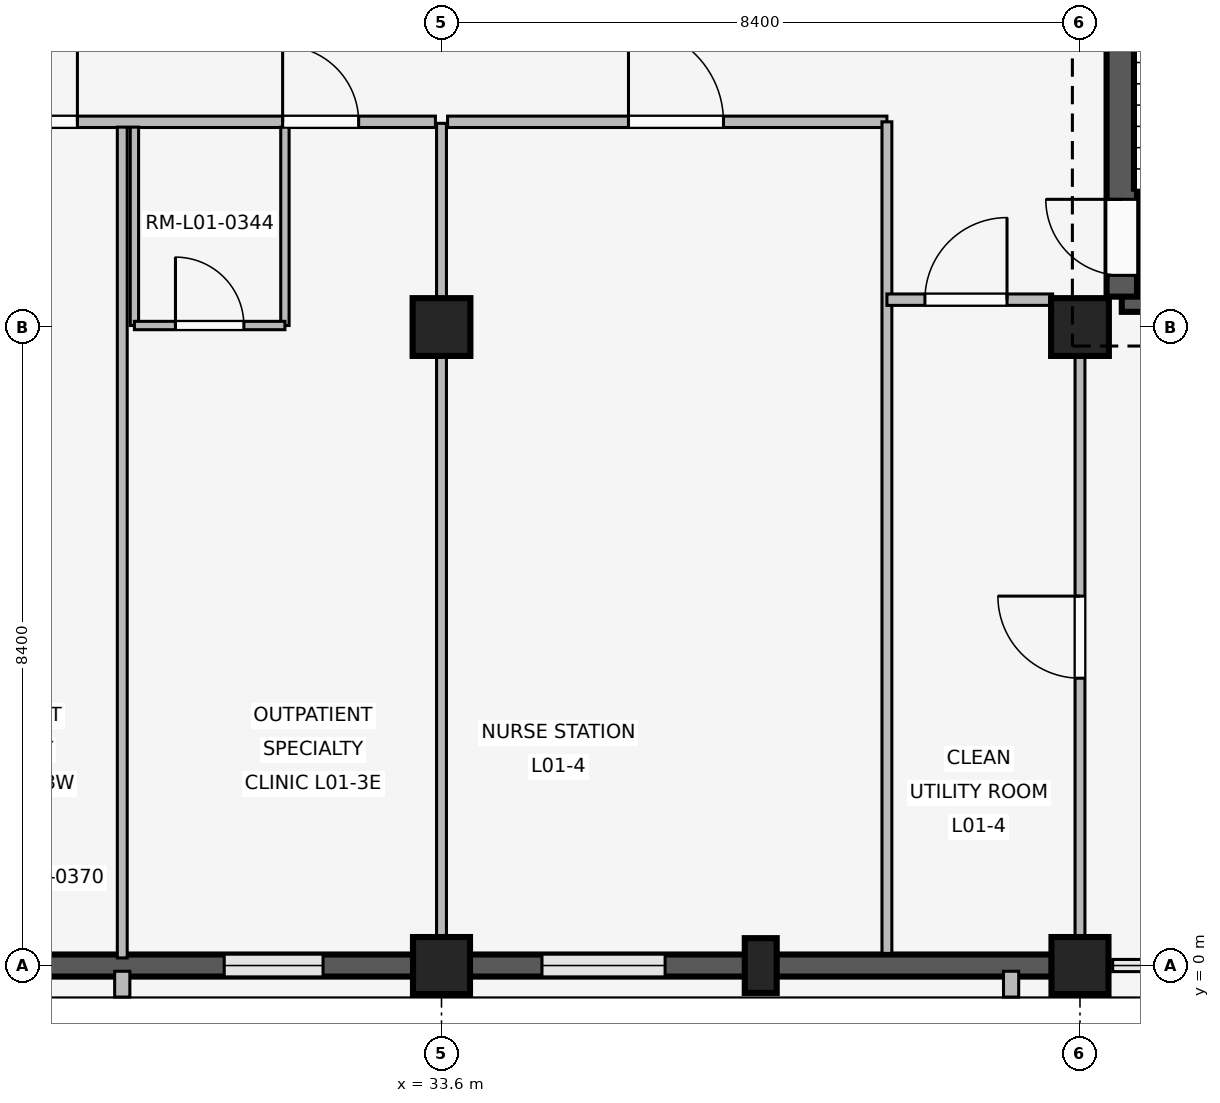
"""IFC4 building model, lengths in metres.
Left out: names, types, materials, properties, quantities, classifications, styles, units other than length and angle.
Written with IfcOpenShell. Run it as: python <this file> out.ifc"""

import sys

from ifc_helpers import new_model, si_unit, direction, frame, frame_2d, origin, origin_2d, place, context, subcontext, project, spatial, rectangle, extrude, element, fill, save


model = new_model("IFC4")
c1 = context("Model", 3, precision=1e-05, world=origin(), true_north=direction((0.0, 1.0)))
c2 = subcontext(c1, "Body", "Model", "MODEL_VIEW")
j1 = project(units=[si_unit("LENGTHUNIT", "METRE"), si_unit("PLANEANGLEUNIT", "RADIAN")], contexts=[c1])
p1 = place(None, origin())
s1 = spatial("IfcSite", under=j1, at=p1, CompositionType="ELEMENT")
p2 = place(p1, origin())
s2 = spatial("IfcBuilding", under=s1, at=p2, CompositionType="ELEMENT")
p3 = place(p2, frame((0.0, 0.0, 4.8)))
s3 = spatial("IfcBuildingStorey", under=s2, at=p3, CompositionType="ELEMENT", Elevation=4.8)
p4 = place(p3, frame((33.6, 0.0, 0.0), z_axis=(0.0, 0.0, 1.0), x_axis=(1.0, 0.0, 0.0)))
e1 = element("IfcColumn", 1, at=p4, inside=s3, PredefinedType="COLUMN", context=c2, shape_type="SweptSolid", body=[
    extrude(rectangle(XDim=0.75, YDim=0.75, at=origin_2d()), origin(), (0.0, 0.0, 1.0), 3.3),
])
p5 = place(p3, frame((33.6, 8.4, 0.0), z_axis=(0.0, 0.0, 1.0), x_axis=(1.0, 0.0, 0.0)))
e2 = element("IfcColumn", 2, at=p5, inside=s3, PredefinedType="COLUMN", context=c2, shape_type="SweptSolid", body=[
    extrude(rectangle(XDim=0.76, YDim=0.76, at=origin_2d()), origin(), (0.0, 0.0, 1.0), 3.3),
])
p6 = place(p3, frame((42.0, 0.0, 0.0), z_axis=(0.0, 0.0, 1.0), x_axis=(1.0, 0.0, 0.0)))
e3 = element("IfcColumn", 3, at=p6, inside=s3, PredefinedType="COLUMN", context=c2, shape_type="SweptSolid", body=[
    extrude(rectangle(XDim=0.75, YDim=0.75, at=origin_2d()), origin(), (0.0, 0.0, 1.0), 3.3),
])
p7 = place(p3, frame((42.0, 8.4, 0.0), z_axis=(0.0, 0.0, 1.0), x_axis=(1.0, 0.0, 0.0)))
e4 = element("IfcColumn", 4, at=p7, inside=s3, PredefinedType="COLUMN", context=c2, shape_type="SweptSolid", body=[
    extrude(rectangle(XDim=0.76, YDim=0.76, at=origin_2d()), origin(), (0.0, 0.0, 1.0), 3.3),
])
p8 = place(p3, frame((37.8, 0.0, 0.0), z_axis=(0.0, 0.0, 1.0), x_axis=(1.0, 0.0, 0.0)))
e5 = element("IfcColumn", 5, at=p8, inside=s3, PredefinedType="PILASTER", context=c2, shape_type="SweptSolid", body=[
    extrude(rectangle(XDim=0.42, YDim=0.72, at=origin_2d()), origin(), (0.0, 0.0, 1.0), 3.3),
])
p9 = place(p3, frame((33.23, 0.0, 0.0), z_axis=(0.0, 0.0, 1.0), x_axis=(-1.0, 0.0, 0.0)))
e6 = element("IfcWall", 6, at=p9, inside=s3, PredefinedType="SOLIDWALL", context=c2, shape_type="SweptSolid", body=[
    extrude(rectangle(XDim=7.66, YDim=0.29, at=frame_2d((3.83, 0.0))), origin(), (0.0, 0.0, 1.0), 2.42),
])
p10 = place(p9, frame((1.188, 0.0, 1.05)))
e7 = element("IfcOpeningElement", 7, at=p10, cuts=e6, PredefinedType="OPENING", context=c2, shape_type="SweptSolid", body=[
    extrude(rectangle(XDim=1.3, YDim=0.75, at=frame_2d((0.65, 0.375))), frame((0.0, 0.155, 0.0), z_axis=(0.0, -1.0, 0.0), x_axis=(1.0, 0.0, 0.0)), (0.0, 0.0, 1.0), 0.31),
])
p11 = place(p9, frame((5.172, 0.0, 1.05)))
e8 = element("IfcOpeningElement", 8, at=p11, cuts=e6, PredefinedType="OPENING", context=c2, shape_type="SweptSolid", body=[
    extrude(rectangle(XDim=1.3, YDim=0.75, at=frame_2d((0.65, 0.375))), frame((0.0, 0.155, 0.0), z_axis=(0.0, -1.0, 0.0), x_axis=(1.0, 0.0, 0.0)), (0.0, 0.0, 1.0), 0.31),
])
p12 = place(p3, frame((29.4, -0.075, 0.0), z_axis=(0.0, 0.0, 1.0), x_axis=(0.0, -1.0, 0.0)))
e9 = element("IfcWall", 9, at=p12, inside=s3, PredefinedType="ELEMENTEDWALL", context=c2, shape_type="SweptSolid", body=[
    extrude(rectangle(XDim=0.34, YDim=0.2, at=frame_2d((0.17, 0.0))), origin(), (0.0, 0.0, 1.0), 2.4),
])
p13 = place(p3, frame((41.63, 0.0, 0.0), z_axis=(0.0, 0.0, 1.0), x_axis=(-1.0, 0.0, 0.0)))
e10 = element("IfcWall", 10, at=p13, inside=s3, PredefinedType="SOLIDWALL", context=c2, shape_type="SweptSolid", body=[
    extrude(rectangle(XDim=7.66, YDim=0.29, at=frame_2d((3.83, 0.0))), origin(), (0.0, 0.0, 1.0), 2.42),
])
p14 = place(p13, frame((5.088, 0.0, 0.85)))
e11 = element("IfcOpeningElement", 11, at=p14, cuts=e10, PredefinedType="OPENING", context=c2, shape_type="SweptSolid", body=[
    extrude(rectangle(XDim=1.62, YDim=0.95, at=frame_2d((0.81, 0.475))), frame((0.0, 0.155, 0.0), z_axis=(0.0, -1.0, 0.0), x_axis=(1.0, 0.0, 0.0)), (0.0, 0.0, 1.0), 0.31),
])
p15 = place(p3, frame((41.094, -0.075, 0.0), z_axis=(0.0, 0.0, 1.0), x_axis=(0.0, -1.0, 0.0)))
e12 = element("IfcWall", 12, at=p15, inside=s3, PredefinedType="ELEMENTEDWALL", context=c2, shape_type="SweptSolid", body=[
    extrude(rectangle(XDim=0.34, YDim=0.2, at=frame_2d((0.17, 0.0))), origin(), (0.0, 0.0, 1.0), 2.4),
])
p16 = place(p3, frame((42.55, 8.8, 0.0), z_axis=(0.0, 0.0, 1.0), x_axis=(1.0, 0.0, 0.0)))
e13 = element("IfcWall", 13, at=p16, inside=s3, PredefinedType="SHEAR", context=c2, shape_type="SweptSolid", body=[
    extrude(rectangle(XDim=7.5, YDim=0.4, at=frame_2d((3.75, 0.0))), origin(), (0.0, 0.0, 1.0), 3.02),
])
p17 = place(p16, frame((4.85, 0.0, 0.0)))
e14 = element("IfcOpeningElement", 14, at=p17, cuts=e13, PredefinedType="OPENING", context=c2, shape_type="SweptSolid", body=[
    extrude(rectangle(XDim=1.2, YDim=2.1, at=frame_2d((0.6, 1.05))), frame((0.0, 0.21, 0.0), z_axis=(0.0, -1.0, 0.0), x_axis=(1.0, 0.0, 0.0)), (0.0, 0.0, 1.0), 0.42),
])
p18 = place(p3, frame((42.55, 8.8, 0.0), z_axis=(0.0, 0.0, 1.0), x_axis=(0.0, 1.0, 0.0)))
e15 = element("IfcWall", 15, at=p18, inside=s3, PredefinedType="SHEAR", context=c2, shape_type="SweptSolid", body=[
    extrude(rectangle(XDim=7.55, YDim=0.4, at=frame_2d((3.775, 0.0))), origin(), (0.0, 0.0, 1.0), 3.02),
])
p19 = place(p18, frame((0.28, 0.0, 0.0)))
e16 = element("IfcOpeningElement", 16, at=p19, cuts=e15, PredefinedType="OPENING", context=c2, shape_type="SweptSolid", body=[
    extrude(rectangle(XDim=1.0, YDim=2.15, at=frame_2d((0.5, 1.075))), frame((0.0, 0.21, 0.0), z_axis=(0.0, -1.0, 0.0), x_axis=(1.0, 0.0, 0.0)), (0.0, 0.0, 1.0), 0.42),
])
p20 = place(p3, frame((25.28, 11.1, 0.0), z_axis=(0.0, 0.0, 1.0), x_axis=(1.0, 0.0, 0.0)))
e17 = element("IfcWall", 17, at=p20, inside=s3, PredefinedType="PARTITIONING", context=c2, shape_type="SweptSolid", body=[
    extrude(rectangle(XDim=8.24, YDim=0.15, at=frame_2d((4.12, 0.0))), origin(), (0.0, 0.0, 1.0), 2.4),
])
p21 = place(p20, frame((2.53, 0.0, 0.0)))
e18 = element("IfcOpeningElement", 18, at=p21, cuts=e17, PredefinedType="OPENING", context=c2, shape_type="SweptSolid", body=[
    extrude(rectangle(XDim=1.0, YDim=2.15, at=frame_2d((0.5, 1.075))), frame((0.0, 0.085, 0.0), z_axis=(0.0, -1.0, 0.0), x_axis=(1.0, 0.0, 0.0)), (0.0, 0.0, 1.0), 0.17),
])
p22 = place(p20, frame((6.23, 0.0, 0.0)))
e19 = element("IfcOpeningElement", 19, at=p22, cuts=e17, PredefinedType="OPENING", context=c2, shape_type="SweptSolid", body=[
    extrude(rectangle(XDim=1.0, YDim=2.15, at=frame_2d((0.5, 1.075))), frame((0.0, 0.085, 0.0), z_axis=(0.0, -1.0, 0.0), x_axis=(1.0, 0.0, 0.0)), (0.0, 0.0, 1.0), 0.17),
])
p23 = place(p3, frame((29.4, 0.1, 0.0), z_axis=(0.0, 0.0, 1.0), x_axis=(0.0, 1.0, 0.0)))
e20 = element("IfcWall", 20, at=p23, inside=s3, PredefinedType="PARTITIONING", context=c2, shape_type="SweptSolid", body=[
    extrude(rectangle(XDim=10.93, YDim=0.13, at=frame_2d((5.465, 0.0))), origin(), (0.0, 0.0, 1.0), 2.4),
])
for number, where, z_axis, x_axis in (
    (21, (29.56, 8.42, 0.0), (0.0, 0.0, 1.0), (0.0, 1.0, 0.0)),
    (22, (31.54, 8.42, 0.0), (0.0, 0.0, 1.0), (0.0, 1.0, 0.0)),
):
    element("IfcWall", number, at=place(p3, frame(where, z_axis=z_axis, x_axis=x_axis)), inside=s3, PredefinedType="PARTITIONING", context=c2, shape_type="SweptSolid", body=[
        extrude(rectangle(XDim=2.61, YDim=0.11, at=frame_2d((1.305, 0.0))), origin(), (0.0, 0.0, 1.0), 2.4),
    ])
p24 = place(p3, frame((29.56, 8.42, 0.0), z_axis=(0.0, 0.0, 1.0), x_axis=(1.0, 0.0, 0.0)))
e23 = element("IfcWall", 23, at=p24, inside=s3, PredefinedType="PARTITIONING", context=c2, shape_type="SweptSolid", body=[
    extrude(rectangle(XDim=1.98, YDim=0.11, at=frame_2d((0.99, 0.0))), origin(), (0.0, 0.0, 1.0), 2.4),
])
p25 = place(p24, frame((0.54, 0.0, 0.0)))
e24 = element("IfcOpeningElement", 24, at=p25, cuts=e23, PredefinedType="OPENING", context=c2, shape_type="SweptSolid", body=[
    extrude(rectangle(XDim=0.9, YDim=2.1, at=frame_2d((0.45, 1.05))), frame((0.0, 0.065, 0.0), z_axis=(0.0, -1.0, 0.0), x_axis=(1.0, 0.0, 0.0)), (0.0, 0.0, 1.0), 0.13),
])
p26 = place(p3, frame((28.05, 1.15, 0.0), z_axis=(0.0, 0.0, 1.0), x_axis=(1.0, 0.0, 0.0)))
e25 = element("IfcWall", 25, at=p26, inside=s3, PredefinedType="PLUMBINGWALL", context=c2, shape_type="SweptSolid", body=[
    extrude(rectangle(XDim=0.9, YDim=0.24, at=frame_2d((0.45, 0.0))), origin(), (0.0, 0.0, 1.0), 2.4),
])
p27 = place(p3, frame((33.6, 0.14, 0.0), z_axis=(0.0, 0.0, 1.0), x_axis=(0.0, 1.0, 0.0)))
e26 = element("IfcWall", 26, at=p27, inside=s3, PredefinedType="PARTITIONING", context=c2, shape_type="SweptSolid", body=[
    extrude(rectangle(XDim=10.94, YDim=0.13, at=frame_2d((5.47, 0.0))), origin(), (0.0, 0.0, 1.0), 2.4),
])
p28 = place(p3, frame((33.68, 11.1, 0.0), z_axis=(0.0, 0.0, 1.0), x_axis=(1.0, 0.0, 0.0)))
e27 = element("IfcWall", 27, at=p28, inside=s3, PredefinedType="PARTITIONING", context=c2, shape_type="SweptSolid", body=[
    extrude(rectangle(XDim=5.78, YDim=0.15, at=frame_2d((2.89, 0.0))), origin(), (0.0, 0.0, 1.0), 2.4),
])
p29 = place(p28, frame((2.38, 0.0, 0.0)))
e28 = element("IfcOpeningElement", 28, at=p29, cuts=e27, PredefinedType="OPENING", context=c2, shape_type="SweptSolid", body=[
    extrude(rectangle(XDim=1.25, YDim=2.2, at=frame_2d((0.625, 1.1))), frame((0.0, 0.085, 0.0), z_axis=(0.0, -1.0, 0.0), x_axis=(1.0, 0.0, 0.0)), (0.0, 0.0, 1.0), 0.17),
])
p30 = place(p3, frame((39.46, 0.16, 0.0), z_axis=(0.0, 0.0, 1.0), x_axis=(0.0, 1.0, 0.0)))
e29 = element("IfcWall", 29, at=p30, inside=s3, PredefinedType="PARTITIONING", context=c2, shape_type="SweptSolid", body=[
    extrude(rectangle(XDim=10.94, YDim=0.13, at=frame_2d((5.47, 0.0))), origin(), (0.0, 0.0, 1.0), 2.4),
])
p31 = place(p3, frame((39.46, 8.76, 0.0), z_axis=(0.0, 0.0, 1.0), x_axis=(1.0, 0.0, 0.0)))
e30 = element("IfcWall", 30, at=p31, inside=s3, PredefinedType="PARTITIONING", context=c2, shape_type="SweptSolid", body=[
    extrude(rectangle(XDim=2.18, YDim=0.15, at=frame_2d((1.09, 0.0))), origin(), (0.0, 0.0, 1.0), 2.4),
])
p32 = place(p31, frame((0.5, 0.0, 0.0)))
e31 = element("IfcOpeningElement", 31, at=p32, cuts=e30, PredefinedType="OPENING", context=c2, shape_type="SweptSolid", body=[
    extrude(rectangle(XDim=1.08, YDim=2.15, at=frame_2d((0.54, 1.075))), frame((0.0, 0.085, 0.0), z_axis=(0.0, -1.0, 0.0), x_axis=(1.0, 0.0, 0.0)), (0.0, 0.0, 1.0), 0.17),
])
p33 = place(p3, frame((42.0, 0.14, 0.0), z_axis=(0.0, 0.0, 1.0), x_axis=(0.0, 1.0, 0.0)))
e32 = element("IfcWall", 32, at=p33, inside=s3, PredefinedType="PARTITIONING", context=c2, shape_type="SweptSolid", body=[
    extrude(rectangle(XDim=8.21, YDim=0.13, at=frame_2d((4.105, 0.0))), origin(), (0.0, 0.0, 1.0), 2.4),
])
p34 = place(p33, frame((3.64, 0.0, 0.0)))
e33 = element("IfcOpeningElement", 33, at=p34, cuts=e32, PredefinedType="OPENING", context=c2, shape_type="SweptSolid", body=[
    extrude(rectangle(XDim=1.08, YDim=2.15, at=frame_2d((0.54, 1.075))), frame((0.0, 0.075, 0.0), z_axis=(0.0, -1.0, 0.0), x_axis=(1.0, 0.0, 0.0)), (0.0, 0.0, 1.0), 0.15),
])
p35 = place(p10, origin())
e34 = element("IfcWindow", 34, at=p35, inside=s3, PartitioningType="SINGLE_PANEL", PredefinedType="WINDOW", context=c2, shape_type="SweptSolid", body=[
    extrude(rectangle(XDim=1.3, YDim=0.75, at=frame_2d((0.65, 0.375))), frame((0.0, 0.03, 0.0), z_axis=(0.0, -1.0, 0.0), x_axis=(1.0, 0.0, 0.0)), (0.0, 0.0, 1.0), 0.06),
])
fill(e7, e34)
p36 = place(p14, origin())
e35 = element("IfcWindow", 35, at=p36, inside=s3, PartitioningType="SINGLE_PANEL", PredefinedType="WINDOW", context=c2, shape_type="SweptSolid", body=[
    extrude(rectangle(XDim=1.62, YDim=0.95, at=frame_2d((0.81, 0.475))), frame((0.0, 0.03, 0.0), z_axis=(0.0, -1.0, 0.0), x_axis=(1.0, 0.0, 0.0)), (0.0, 0.0, 1.0), 0.06),
])
fill(e11, e35)
p37 = place(p19, origin())
e36 = element("IfcDoor", 36, at=p37, inside=s3, OperationType="SINGLE_SWING_RIGHT", PredefinedType="DOOR", context=c2, shape_type="SweptSolid", body=[
    extrude(rectangle(XDim=1.0, YDim=2.15, at=frame_2d((0.5, 1.075))), frame((0.0, 0.025, 0.0), z_axis=(0.0, -1.0, 0.0), x_axis=(1.0, 0.0, 0.0)), (0.0, 0.0, 1.0), 0.05),
])
fill(e16, e36)
p38 = place(p21, origin())
e37 = element("IfcDoor", 37, at=p38, inside=s3, OperationType="SINGLE_SWING_RIGHT", PredefinedType="DOOR", context=c2, shape_type="SweptSolid", body=[
    extrude(rectangle(XDim=1.0, YDim=2.15, at=frame_2d((0.5, 1.075))), frame((0.0, 0.025, 0.0), z_axis=(0.0, -1.0, 0.0), x_axis=(1.0, 0.0, 0.0)), (0.0, 0.0, 1.0), 0.05),
])
fill(e18, e37)
p39 = place(p22, origin())
e38 = element("IfcDoor", 38, at=p39, inside=s3, OperationType="SINGLE_SWING_LEFT", PredefinedType="DOOR", context=c2, shape_type="SweptSolid", body=[
    extrude(rectangle(XDim=1.0, YDim=2.15, at=frame_2d((0.5, 1.075))), frame((0.0, 0.025, 0.0), z_axis=(0.0, -1.0, 0.0), x_axis=(1.0, 0.0, 0.0)), (0.0, 0.0, 1.0), 0.05),
])
fill(e19, e38)
p40 = place(p25, origin())
e39 = element("IfcDoor", 39, at=p40, inside=s3, OperationType="SINGLE_SWING_LEFT", PredefinedType="DOOR", context=c2, shape_type="SweptSolid", body=[
    extrude(rectangle(XDim=0.9, YDim=2.1, at=frame_2d((0.45, 1.05))), frame((0.0, 0.025, 0.0), z_axis=(0.0, -1.0, 0.0), x_axis=(1.0, 0.0, 0.0)), (0.0, 0.0, 1.0), 0.05),
])
fill(e24, e39)
p41 = place(p29, origin())
e40 = element("IfcDoor", 40, at=p41, inside=s3, OperationType="SINGLE_SWING_LEFT", PredefinedType="DOOR", context=c2, shape_type="SweptSolid", body=[
    extrude(rectangle(XDim=1.25, YDim=2.2, at=frame_2d((0.625, 1.1))), frame((0.0, 0.025, 0.0), z_axis=(0.0, -1.0, 0.0), x_axis=(1.0, 0.0, 0.0)), (0.0, 0.0, 1.0), 0.05),
])
fill(e28, e40)
p42 = place(p32, origin())
e41 = element("IfcDoor", 41, at=p42, inside=s3, OperationType="SINGLE_SWING_RIGHT", PredefinedType="DOOR", context=c2, shape_type="SweptSolid", body=[
    extrude(rectangle(XDim=1.08, YDim=2.15, at=frame_2d((0.54, 1.075))), frame((0.0, 0.025, 0.0), z_axis=(0.0, -1.0, 0.0), x_axis=(1.0, 0.0, 0.0)), (0.0, 0.0, 1.0), 0.05),
])
fill(e31, e41)
p43 = place(p34, origin())
e42 = element("IfcDoor", 42, at=p43, inside=s3, OperationType="SINGLE_SWING_RIGHT", PredefinedType="DOOR", context=c2, shape_type="SweptSolid", body=[
    extrude(rectangle(XDim=1.08, YDim=2.15, at=frame_2d((0.54, 1.075))), frame((0.0, 0.025, 0.0), z_axis=(0.0, -1.0, 0.0), x_axis=(1.0, 0.0, 0.0)), (0.0, 0.0, 1.0), 0.05),
])
fill(e33, e42)
save(model, sys.argv[1])
